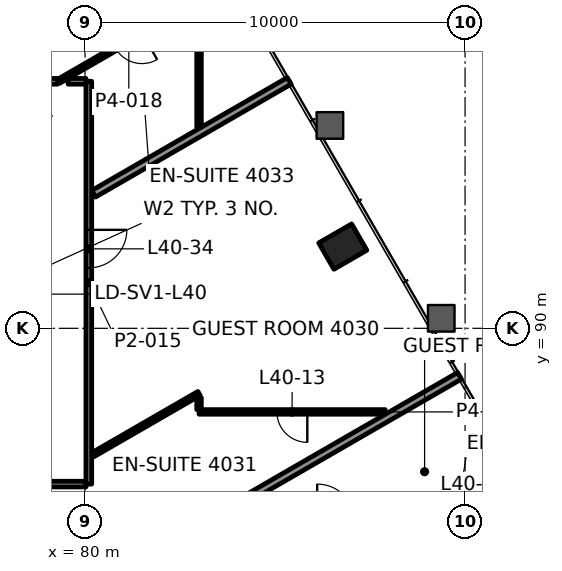
"""IFC4 building model, lengths in metres.
Left out: names, types, materials, properties, quantities, classifications, styles, units other than length and angle.
Written with IfcOpenShell. Run it as: python <this file> out.ifc"""

import sys

from ifc_helpers import new_model, si_unit, direction, frame, frame_2d, origin, origin_2d, place, context, subcontext, project, spatial, rectangle, hollow_rectangle, extrude, element, fill, save


model = new_model("IFC4")
c1 = context("Model", 3, precision=1e-05, world=origin(), true_north=direction((0.0, 1.0)))
c2 = subcontext(c1, "Body", "Model", "MODEL_VIEW")
j1 = project(units=[si_unit("LENGTHUNIT", "METRE"), si_unit("PLANEANGLEUNIT", "RADIAN")], contexts=[c1])
p1 = place(None, origin())
s1 = spatial("IfcSite", under=j1, at=p1, CompositionType="ELEMENT")
p2 = place(p1, origin())
s2 = spatial("IfcBuilding", under=s1, at=p2, CompositionType="ELEMENT")
p3 = place(p2, frame((0.0, 0.0, 175.3)))
s3 = spatial("IfcBuildingStorey", under=s2, at=p3, CompositionType="ELEMENT", Elevation=175.3)
p4 = place(p3, frame((86.782, 92.151, -0.0), z_axis=(0.0, 0.0, 1.0), x_axis=(-0.5, 0.866025403784, 0.0)))
e1 = element("IfcColumn", 1, at=p4, inside=s3, PredefinedType="COLUMN", context=c2, shape_type="SweptSolid", body=[
    extrude(hollow_rectangle(XDim=0.8, YDim=1.0, WallThickness=0.05, at=origin_2d()), origin(), (0.0, 0.0, 1.0), 3.9),
])
p5 = place(p3, frame((78.868, 85.9, 0.0), z_axis=(0.0, 0.0, 1.0), x_axis=(1.0, 0.0, 0.0)))
e2 = element("IfcWall", 2, at=p5, inside=s3, PredefinedType="PARTITIONING", context=c2, shape_type="SweptSolid", body=[
    extrude(rectangle(XDim=1.157, YDim=0.15, at=frame_2d((0.578, 0.0))), origin(), (0.0, 0.0, 1.0), 3.1),
])
p6 = place(p3, frame((87.898, 87.8, 0.0), z_axis=(0.0, 0.0, 1.0), x_axis=(-1.0, 0.0, 0.0)))
e3 = element("IfcWall", 3, at=p6, inside=s3, PredefinedType="PARTITIONING", context=c2, shape_type="SweptSolid", body=[
    extrude(rectangle(XDim=4.898, YDim=0.12, at=frame_2d((2.449, 0.0))), origin(), (0.0, 0.0, 1.0), 3.1),
])
p7 = place(p6, frame((2.049, 0.0, 0.0)))
e4 = element("IfcOpeningElement", 4, at=p7, cuts=e3, PredefinedType="OPENING", context=c2, shape_type="SweptSolid", body=[
    extrude(rectangle(XDim=0.8, YDim=2.1, at=frame_2d((0.4, 1.05))), frame((0.0, 0.07, 0.0), z_axis=(0.0, -1.0, 0.0), x_axis=(1.0, 0.0, 0.0)), (0.0, 0.0, 1.0), 0.14),
])
p8 = place(p3, frame((75.975, 96.5, 0.0), z_axis=(0.0, 0.0, 1.0), x_axis=(1.0, 0.0, 0.0)))
e5 = element("IfcWall", 5, at=p8, inside=s3, PredefinedType="PARTITIONING", context=c2, shape_type="SweptSolid", body=[
    extrude(rectangle(XDim=3.299, YDim=0.15, at=frame_2d((1.649, 0.0))), origin(), (0.0, 0.0, 1.0), 3.1),
])
p9 = place(p8, frame((1.814, 0.0, 0.0)))
e6 = element("IfcOpeningElement", 6, at=p9, cuts=e5, PredefinedType="OPENING", context=c2, shape_type="SweptSolid", body=[
    extrude(rectangle(XDim=1.0, YDim=2.1, at=frame_2d((0.5, 1.05))), frame((0.0, 0.085, 0.0), z_axis=(0.0, -1.0, 0.0), x_axis=(1.0, 0.0, 0.0)), (0.0, 0.0, 1.0), 0.17),
])
p10 = place(p3, frame((83.471, 85.065, 0.0), z_axis=(0.0, 0.0, 1.0), x_axis=(0.866022862013, 0.500004402451, 0.0)))
e7 = element("IfcWall", 7, at=p10, inside=s3, PredefinedType="PARTITIONING", context=c2, shape_type="SweptSolid", body=[
    extrude(rectangle(XDim=7.371, YDim=0.2, at=frame_2d((3.685, 0.0))), origin(), (0.0, 0.0, 1.0), 3.022),
])
p11 = place(p3, frame((80.209, 86.675, 0.0), z_axis=(0.0, 0.0, 1.0), x_axis=(0.86604299788, 0.499969524894, 0.0)))
e8 = element("IfcWall", 8, at=p11, inside=s3, PredefinedType="PARTITIONING", context=c2, shape_type="SweptSolid", body=[
    extrude(rectangle(XDim=3.222, YDim=0.12, at=frame_2d((1.611, 0.0))), origin(), (0.0, 0.0, 1.0), 3.1),
])
p12 = place(p3, frame((80.227, 93.541, 0.0), z_axis=(0.0, 0.0, 1.0), x_axis=(0.86603507536, 0.499983247966, 0.0)))
e9 = element("IfcWall", 9, at=p12, inside=s3, PredefinedType="PARTITIONING", context=c2, shape_type="SweptSolid", body=[
    extrude(rectangle(XDim=5.943, YDim=0.2, at=frame_2d((2.971, 0.0))), origin(), (0.0, 0.0, 1.0), 3.022),
])
p13 = place(p3, frame((83.0, 98.634, 0.0), z_axis=(0.0, 0.0, 1.0), x_axis=(-0.866013160285, -0.500021205763, 0.0)))
e10 = element("IfcWall", 10, at=p13, inside=s3, PredefinedType="PARTITIONING", context=c2, shape_type="SweptSolid", body=[
    extrude(rectangle(XDim=4.268, YDim=0.12, at=frame_2d((2.134, 0.0))), origin(), (0.0, 0.0, 1.0), 3.022),
])
p14 = place(p13, frame((1.734, 0.0, 0.0)))
e11 = element("IfcOpeningElement", 11, at=p14, cuts=e10, PredefinedType="OPENING", context=c2, shape_type="SweptSolid", body=[
    extrude(rectangle(XDim=0.8, YDim=2.1, at=frame_2d((0.4, 1.05))), frame((0.0, 0.07, 0.0), z_axis=(0.0, -1.0, 0.0), x_axis=(1.0, 0.0, 0.0)), (0.0, 0.0, 1.0), 0.14),
])
p15 = place(p3, frame((83.0, 87.86, 0.0), z_axis=(0.0, 0.0, 1.0), x_axis=(0.0, 1.0, 0.0)))
e12 = element("IfcWall", 12, at=p15, inside=s3, PredefinedType="PARTITIONING", context=c2, shape_type="SweptSolid", body=[
    extrude(rectangle(XDim=0.316, YDim=0.12, at=frame_2d((0.158, 0.0))), origin(), (0.0, 0.0, 1.0), 3.1),
])
p16 = place(p3, frame((83.0, 95.297, 0.0), z_axis=(0.0, 0.0, 1.0), x_axis=(0.0, 1.0, 0.0)))
e13 = element("IfcWall", 13, at=p16, inside=s3, PredefinedType="PARTITIONING", context=c2, shape_type="SweptSolid", body=[
    extrude(rectangle(XDim=3.228, YDim=0.12, at=frame_2d((1.614, 0.0))), origin(), (0.0, 0.0, 1.0), 3.022),
])
p17 = place(p3, frame((80.1, 96.5, 0.0), z_axis=(0.0, 0.0, 1.0), x_axis=(0.0, -1.0, 0.0)))
e14 = element("IfcWall", 14, at=p17, inside=s3, PredefinedType="PARTITIONING", context=c2, shape_type="SweptSolid", body=[
    extrude(rectangle(XDim=10.6, YDim=0.15, at=frame_2d((5.3, 0.0))), origin(), (0.0, 0.0, 1.0), 3.022),
])
p18 = place(p17, frame((3.909, 0.0, 0.0)))
e15 = element("IfcOpeningElement", 15, at=p18, cuts=e14, PredefinedType="OPENING", context=c2, shape_type="SweptSolid", body=[
    extrude(rectangle(XDim=1.0, YDim=2.1, at=frame_2d((0.5, 1.05))), frame((0.0, 0.085, 0.0), z_axis=(0.0, -1.0, 0.0), x_axis=(1.0, 0.0, 0.0)), (0.0, 0.0, 1.0), 0.17),
])
p19 = place(p3, frame((79.555, 96.5, 0.0), z_axis=(0.0, 0.0, 1.0), x_axis=(1.0, 0.0, 0.0)))
e16 = element("IfcWall", 16, at=p19, inside=s3, PredefinedType="PARTITIONING", context=c2, shape_type="SweptSolid", body=[
    extrude(rectangle(XDim=0.47, YDim=0.15, at=frame_2d((0.235, 0.0))), origin(), (0.0, 0.0, 1.0), 3.1),
])
p20 = place(p7, origin())
e17 = element("IfcDoor", 17, at=p20, inside=s3, OperationType="SINGLE_SWING_LEFT", PredefinedType="DOOR", context=c2, shape_type="SweptSolid", body=[
    extrude(rectangle(XDim=0.8, YDim=2.1, at=frame_2d((0.4, 1.05))), frame((0.0, 0.025, 0.0), z_axis=(0.0, -1.0, 0.0), x_axis=(1.0, 0.0, 0.0)), (0.0, 0.0, 1.0), 0.05),
])
fill(e4, e17)
p21 = place(p18, origin())
e18 = element("IfcDoor", 18, at=p21, inside=s3, OperationType="SINGLE_SWING_RIGHT", PredefinedType="DOOR", context=c2, shape_type="SweptSolid", body=[
    extrude(rectangle(XDim=1.0, YDim=2.1, at=frame_2d((0.5, 1.05))), frame((0.0, 0.025, 0.0), z_axis=(0.0, -1.0, 0.0), x_axis=(1.0, 0.0, 0.0)), (0.0, 0.0, 1.0), 0.05),
])
fill(e15, e18)
save(model, sys.argv[1])
